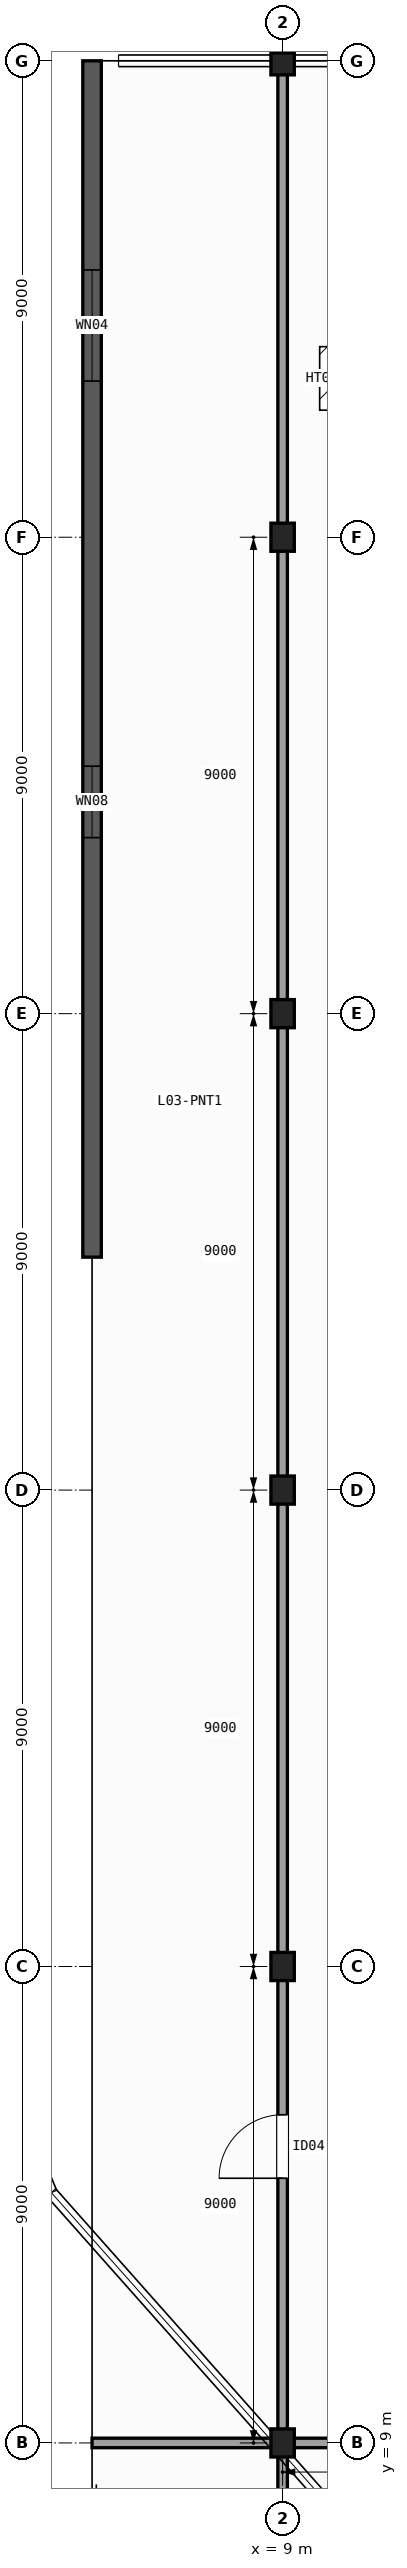
"""IFC4 building model, lengths in metres.
Left out: names, types, materials, properties, quantities, classifications, styles, units other than length and angle.
Written with IfcOpenShell. Run it as: python <this file> out.ifc"""

import sys

from ifc_helpers import new_model, si_unit, direction, frame, frame_2d, origin, origin_2d, place, context, subcontext, project, spatial, rectangle, i_section, extrude, element, fill, save


model = new_model("IFC4")
c1 = context("Model", 3, precision=1e-05, world=origin(), true_north=direction((0.0, 1.0)))
c2 = subcontext(c1, "Body", "Model", "MODEL_VIEW")
j1 = project(units=[si_unit("LENGTHUNIT", "METRE"), si_unit("PLANEANGLEUNIT", "RADIAN")], contexts=[c1])
p1 = place(None, origin())
s1 = spatial("IfcSite", under=j1, at=p1, CompositionType="ELEMENT")
p2 = place(p1, origin())
s2 = spatial("IfcBuilding", under=s1, at=p2, CompositionType="ELEMENT")
p3 = place(p2, frame((0.0, 0.0, 16.2)))
s3 = spatial("IfcBuildingStorey", under=s2, at=p3, CompositionType="ELEMENT", Elevation=16.2)
for number, where, z_axis, x_axis in (
    (1, (9.0, 9.0, 0.0), (0.0, 0.0, 1.0), (1.0, 0.0, 0.0)),
    (2, (9.0, 18.0, 0.0), (0.0, 0.0, 1.0), (1.0, 0.0, 0.0)),
    (3, (9.0, 27.0, 0.0), (0.0, 0.0, 1.0), (1.0, 0.0, 0.0)),
    (4, (9.0, 36.0, 0.0), (0.0, 0.0, 1.0), (1.0, 0.0, 0.0)),
    (5, (9.0, 45.0, 0.0), (0.0, 0.0, 1.0), (1.0, 0.0, 0.0)),
    (6, (9.0, 54.0, 0.0), (0.0, 0.0, 1.0), (1.0, 0.0, 0.0)),
):
    element("IfcColumn", number, at=place(p3, frame(where, z_axis=z_axis, x_axis=x_axis)), inside=s3, PredefinedType="COLUMN", context=c2, shape_type="SweptSolid", body=[
        extrude(i_section(OverallWidth=0.442, OverallDepth=0.531, WebThickness=0.066, FlangeThickness=0.106, FilletRadius=0.015, at=origin_2d()), origin(), (0.0, 0.0, 1.0), 5.0),
    ])
p4 = place(p3, frame((5.4, 31.4, 0.0), z_axis=(0.0, 0.0, 1.0), x_axis=(0.0, 1.0, 0.0)))
e7 = element("IfcWall", 7, at=p4, inside=s3, PredefinedType="SOLIDWALL", context=c2, shape_type="SweptSolid", body=[
    extrude(rectangle(XDim=22.6, YDim=0.35, at=frame_2d((11.3, 0.0))), origin(), (0.0, 0.0, 1.0), 4.68),
])
p5 = place(p4, frame((7.925, 0.0, 1.0)))
e8 = element("IfcOpeningElement", 8, at=p5, cuts=e7, PredefinedType="OPENING", context=c2, shape_type="SweptSolid", body=[
    extrude(rectangle(XDim=1.35, YDim=2.1, at=frame_2d((0.675, 1.05))), frame((0.0, 0.185, 0.0), z_axis=(0.0, -1.0, 0.0), x_axis=(1.0, 0.0, 0.0)), (0.0, 0.0, 1.0), 0.37),
])
p6 = place(p4, frame((16.55, 0.0, 1.0)))
e9 = element("IfcOpeningElement", 9, at=p6, cuts=e7, PredefinedType="OPENING", context=c2, shape_type="SweptSolid", body=[
    extrude(rectangle(XDim=2.1, YDim=1.8, at=frame_2d((1.05, 0.9))), frame((0.0, 0.185, 0.0), z_axis=(0.0, -1.0, 0.0), x_axis=(1.0, 0.0, 0.0)), (0.0, 0.0, 1.0), 0.37),
])
p7 = place(p3, frame((9.0, 5.4, 0.0), z_axis=(0.0, 0.0, 1.0), x_axis=(0.0, 1.0, 0.0)))
e10 = element("IfcWall", 10, at=p7, inside=s3, PredefinedType="PARTITIONING", context=c2, shape_type="SweptSolid", body=[
    extrude(rectangle(XDim=48.6, YDim=0.18, at=frame_2d((24.3, 0.0))), origin(), (0.0, 0.0, 1.0), 3.712),
])
p8 = place(p7, frame((8.6, 0.0, 0.0)))
e11 = element("IfcOpeningElement", 11, at=p8, cuts=e10, PredefinedType="OPENING", context=c2, shape_type="SweptSolid", body=[
    extrude(rectangle(XDim=1.2, YDim=2.15, at=frame_2d((0.6, 1.075))), frame((0.0, 0.1, 0.0), z_axis=(0.0, -1.0, 0.0), x_axis=(1.0, 0.0, 0.0)), (0.0, 0.0, 1.0), 0.2),
])
p9 = place(p3, frame((5.4, 9.0, 0.0), z_axis=(0.0, 0.0, 1.0), x_axis=(1.0, 0.0, 0.0)))
e12 = element("IfcWall", 12, at=p9, inside=s3, PredefinedType="PARTITIONING", context=c2, shape_type="SweptSolid", body=[
    extrude(rectangle(XDim=19.25, YDim=0.18, at=frame_2d((9.625, 0.0))), origin(), (0.0, 0.0, 1.0), 3.733),
])
p10 = place(p9, frame((8.1, 0.0, 0.0)))
e13 = element("IfcOpeningElement", 13, at=p10, cuts=e12, PredefinedType="OPENING", context=c2, shape_type="SweptSolid", body=[
    extrude(rectangle(XDim=1.2, YDim=2.15, at=frame_2d((0.6, 1.075))), frame((0.0, 0.1, 0.0), z_axis=(0.0, -1.0, 0.0), x_axis=(1.0, 0.0, 0.0)), (0.0, 0.0, 1.0), 0.2),
])
p11 = place(p5, origin())
e14 = element("IfcWindow", 14, at=p11, inside=s3, PartitioningType="SINGLE_PANEL", PredefinedType="WINDOW", context=c2, shape_type="SweptSolid", body=[
    extrude(rectangle(XDim=1.35, YDim=2.1, at=frame_2d((0.675, 1.05))), frame((0.0, 0.03, 0.0), z_axis=(0.0, -1.0, 0.0), x_axis=(1.0, 0.0, 0.0)), (0.0, 0.0, 1.0), 0.06),
])
fill(e8, e14)
p12 = place(p6, origin())
e15 = element("IfcWindow", 15, at=p12, inside=s3, PartitioningType="SINGLE_PANEL", PredefinedType="WINDOW", context=c2, shape_type="SweptSolid", body=[
    extrude(rectangle(XDim=2.1, YDim=1.8, at=frame_2d((1.05, 0.9))), frame((0.0, 0.03, 0.0), z_axis=(0.0, -1.0, 0.0), x_axis=(1.0, 0.0, 0.0)), (0.0, 0.0, 1.0), 0.06),
])
fill(e9, e15)
p13 = place(p3, frame((0.0, 0.0, -0.32)))
p14 = place(p13, frame((10.2, 48.0, 0.0)))
p15 = place(p14, frame((0.0, 0.0, 0.27)))
e16 = element("IfcDoor", 16, at=p15, inside=s3, OperationType="SINGLE_SWING_LEFT", PredefinedType="TRAPDOOR", context=c2, shape_type="SweptSolid", body=[
    extrude(rectangle(XDim=1.0, YDim=1.2, at=origin_2d()), origin(), (0.0, 0.0, 1.0), 0.05),
])
p16 = place(p8, origin())
e17 = element("IfcDoor", 17, at=p16, inside=s3, OperationType="SINGLE_SWING_LEFT", PredefinedType="DOOR", context=c2, shape_type="SweptSolid", body=[
    extrude(rectangle(XDim=1.2, YDim=2.15, at=frame_2d((0.6, 1.075))), frame((0.0, 0.025, 0.0), z_axis=(0.0, -1.0, 0.0), x_axis=(1.0, 0.0, 0.0)), (0.0, 0.0, 1.0), 0.05),
])
fill(e11, e17)
save(model, sys.argv[1])
